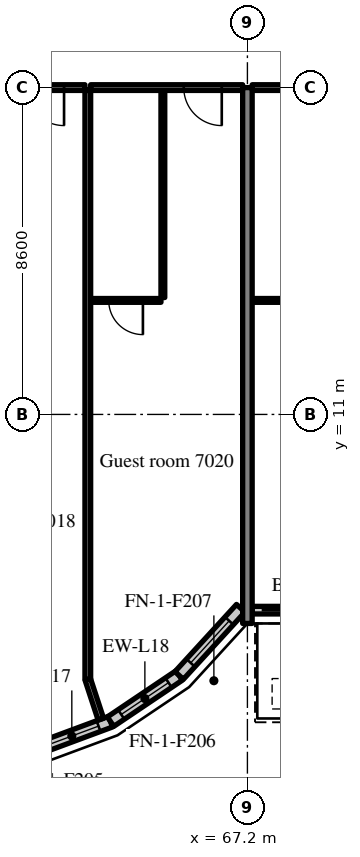
"""IFC4 building model, lengths in metres.
Left out: names, types, materials, properties, quantities, classifications, styles, units other than length and angle.
Written with IfcOpenShell. Run it as: python <this file> out.ifc"""

import sys

from ifc_helpers import new_model, si_unit, direction, frame, frame_2d, origin, place, context, subcontext, project, spatial, rectangle, extrude, source, transform, mapped, element, fill, save


model = new_model("IFC4")
c1 = context("Model", 3, precision=1e-05, world=origin(), true_north=direction((0.0, 1.0)))
c2 = subcontext(c1, "Body", "Model", "MODEL_VIEW")
j1 = project(units=[si_unit("LENGTHUNIT", "METRE"), si_unit("PLANEANGLEUNIT", "RADIAN")], contexts=[c1])
p1 = place(None, origin())
s1 = spatial("IfcSite", under=j1, at=p1, CompositionType="ELEMENT")
p2 = place(p1, origin())
s2 = spatial("IfcBuilding", under=s1, at=p2, CompositionType="ELEMENT")
p3 = place(p2, frame((0.0, 0.0, 293.7)))
s3 = spatial("IfcBuildingStorey", under=s2, at=p3, CompositionType="ELEMENT", Elevation=293.7)
m1 = source(origin(), c2, "Body", "SweptSolid", [
    extrude(rectangle(XDim=14.1, YDim=0.25, at=frame_2d((7.05, 0.0))), origin(), (0.0, 0.0, 1.0), 3.72),
])
p4 = place(p3, frame((67.2, 5.5, 0.0), z_axis=(0.0, 0.0, 1.0), x_axis=(0.0, 1.0, 0.0)))
e1 = element("IfcWall", 1, at=p4, inside=s3, PredefinedType="SHEAR", context=c2, shape_type="MappedRepresentation", body=[
    mapped(m1, transform((0.0, 0.0, 0.0), scale=1.0)),
])
m2 = source(origin(), c2, "Body", "SweptSolid", [
    extrude(rectangle(XDim=2.176, YDim=0.3, at=frame_2d((1.088, 0.0))), origin(), (0.0, 0.0, 1.0), 3.72),
])
p5 = place(p3, frame((61.56, 2.16, 0.0), z_axis=(0.0, 0.0, 1.0), x_axis=(0.937531979054, 0.347899106424, 0.0)))
e2 = element("IfcWall", 2, at=p5, inside=s3, PredefinedType="SOLIDWALL", context=c2, shape_type="MappedRepresentation", body=[
    mapped(m2, transform((0.0, 0.0, 0.0), scale=1.0)),
])
m3 = source(origin(), c2, "Body", "SweptSolid", [
    extrude(rectangle(XDim=1.5, YDim=2.0, at=frame_2d((0.75, 1.0))), frame((0.0, 0.16, 0.0), z_axis=(0.0, -1.0, 0.0), x_axis=(1.0, 0.0, 0.0)), (0.0, 0.0, 1.0), 0.32),
])
p6 = place(p5, frame((0.338, 0.0, 0.9)))
e3 = element("IfcOpeningElement", 3, at=p6, cuts=e2, PredefinedType="OPENING", context=c2, shape_type="MappedRepresentation", body=[
    mapped(m3, transform((0.0, 0.0, 0.0), scale=1.0)),
])
m4 = source(origin(), c2, "Body", "SweptSolid", [
    extrude(rectangle(XDim=2.176, YDim=0.3, at=frame_2d((1.088, 0.0))), origin(), (0.0, 0.0, 1.0), 3.72),
])
p7 = place(p3, frame((63.599, 2.917, 0.0), z_axis=(0.0, 0.0, 1.0), x_axis=(0.829625727223, 0.558319937607, 0.0)))
e4 = element("IfcWall", 4, at=p7, inside=s3, PredefinedType="SOLIDWALL", context=c2, shape_type="MappedRepresentation", body=[
    mapped(m4, transform((0.0, 0.0, 0.0), scale=1.0)),
])
p8 = place(p7, frame((0.338, 0.0, 0.9)))
e5 = element("IfcOpeningElement", 5, at=p8, cuts=e4, PredefinedType="OPENING", context=c2, shape_type="MappedRepresentation", body=[
    mapped(m3, transform((0.0, 0.0, 0.0), scale=1.0)),
])
m5 = source(origin(), c2, "Body", "SweptSolid", [
    extrude(rectangle(XDim=2.398, YDim=0.3, at=frame_2d((1.199, 0.0))), origin(), (0.0, 0.0, 1.0), 3.72),
])
p9 = place(p3, frame((65.404, 4.131, 0.0), z_axis=(0.0, 0.0, 1.0), x_axis=(0.675374189419, 0.737475222815, 0.0)))
e6 = element("IfcWall", 6, at=p9, inside=s3, PredefinedType="SOLIDWALL", context=c2, shape_type="MappedRepresentation", body=[
    mapped(m5, transform((0.0, 0.0, 0.0), scale=1.0)),
])
p10 = place(p9, frame((0.449, 0.0, 0.9)))
e7 = element("IfcOpeningElement", 7, at=p10, cuts=e6, PredefinedType="OPENING", context=c2, shape_type="MappedRepresentation", body=[
    mapped(m3, transform((0.0, 0.0, 0.0), scale=1.0)),
])
m6 = source(origin(), c2, "Body", "SweptSolid", [
    extrude(rectangle(XDim=8.15, YDim=0.2, at=frame_2d((4.075, 0.0))), origin(), (0.0, 0.0, 1.0), 3.17),
])
p11 = place(p3, frame((67.325, 5.85, 0.0), z_axis=(0.0, 0.0, 1.0), x_axis=(1.0, 0.0, 0.0)))
e8 = element("IfcWall", 8, at=p11, inside=s3, PredefinedType="SOLIDWALL", context=c2, shape_type="MappedRepresentation", body=[
    mapped(m6, transform((0.0, 0.0, 0.0), scale=1.0)),
])
m7 = source(origin(), c2, "Body", "SweptSolid", [
    extrude(rectangle(XDim=1.2, YDim=2.4, at=frame_2d((0.6, 1.2))), frame((0.0, 0.11, 0.0), z_axis=(0.0, -1.0, 0.0), x_axis=(1.0, 0.0, 0.0)), (0.0, 0.0, 1.0), 0.22),
])
p12 = place(p11, frame((0.25, 0.0, 0.0)))
e9 = element("IfcOpeningElement", 9, at=p12, cuts=e8, PredefinedType="OPENING", context=c2, shape_type="MappedRepresentation", body=[
    mapped(m7, transform((0.0, 0.0, 0.0), scale=1.0)),
])
m8 = source(origin(), c2, "Body", "SweptSolid", [
    extrude(rectangle(XDim=1.5, YDim=1.5, at=frame_2d((0.75, 0.75))), frame((0.0, 0.11, 0.0), z_axis=(0.0, -1.0, 0.0), x_axis=(1.0, 0.0, 0.0)), (0.0, 0.0, 1.0), 0.22),
])
p13 = place(p11, frame((2.325, 0.0, 0.9)))
e10 = element("IfcOpeningElement", 10, at=p13, cuts=e8, PredefinedType="OPENING", context=c2, shape_type="MappedRepresentation", body=[
    mapped(m8, transform((0.0, 0.0, 0.0), scale=1.0)),
])
p14 = place(p11, frame((4.325, 0.0, 0.0)))
e11 = element("IfcOpeningElement", 11, at=p14, cuts=e8, PredefinedType="OPENING", context=c2, shape_type="MappedRepresentation", body=[
    mapped(m7, transform((0.0, 0.0, 0.0), scale=1.0)),
])
p15 = place(p11, frame((6.4, 0.0, 0.9)))
e12 = element("IfcOpeningElement", 12, at=p15, cuts=e8, PredefinedType="OPENING", context=c2, shape_type="MappedRepresentation", body=[
    mapped(m8, transform((0.0, 0.0, 0.0), scale=1.0)),
])
m9 = source(origin(), c2, "Body", "SweptSolid", [
    extrude(rectangle(XDim=4.0, YDim=0.15, at=frame_2d((2.0, 0.0))), origin(), (0.0, 0.0, 1.0), 3.02),
])
p16 = place(p3, frame((58.925, 19.6, 0.0), z_axis=(0.0, 0.0, 1.0), x_axis=(1.0, 0.0, 0.0)))
e13 = element("IfcWall", 13, at=p16, inside=s3, PredefinedType="PARTITIONING", context=c2, shape_type="MappedRepresentation", body=[
    mapped(m9, transform((0.0, 0.0, 0.0), scale=1.0)),
])
m10 = source(origin(), c2, "Body", "SweptSolid", [
    extrude(rectangle(XDim=1.0, YDim=2.1, at=frame_2d((0.5, 1.05))), frame((0.0, 0.085, 0.0), z_axis=(0.0, -1.0, 0.0), x_axis=(1.0, 0.0, 0.0)), (0.0, 0.0, 1.0), 0.17),
])
p17 = place(p16, frame((2.45, 0.0, 0.0)))
e14 = element("IfcOpeningElement", 14, at=p17, cuts=e13, PredefinedType="OPENING", context=c2, shape_type="MappedRepresentation", body=[
    mapped(m10, transform((0.0, 0.0, 0.0), scale=1.0)),
])
m11 = source(origin(), c2, "Body", "SweptSolid", [
    extrude(rectangle(XDim=5.45, YDim=0.1, at=frame_2d((2.725, 0.0))), origin(), (0.0, 0.0, 1.0), 3.72),
])
p18 = place(p3, frame((64.975, 14.075, 0.0), z_axis=(0.0, 0.0, 1.0), x_axis=(0.0, 1.0, 0.0)))
e15 = element("IfcWall", 15, at=p18, inside=s3, PredefinedType="PARTITIONING", context=c2, shape_type="MappedRepresentation", body=[
    mapped(m11, transform((0.0, 0.0, 0.0), scale=1.0)),
])
m12 = source(origin(), c2, "Body", "SweptSolid", [
    extrude(rectangle(XDim=1.85, YDim=0.1, at=frame_2d((0.925, 0.0))), origin(), (0.0, 0.0, 1.0), 3.72),
])
p19 = place(p3, frame((63.075, 14.0, 0.0), z_axis=(0.0, 0.0, 1.0), x_axis=(1.0, 0.0, 0.0)))
e16 = element("IfcWall", 16, at=p19, inside=s3, PredefinedType="PARTITIONING", context=c2, shape_type="MappedRepresentation", body=[
    mapped(m12, transform((0.0, 0.0, 0.0), scale=1.0)),
])
m13 = source(origin(), c2, "Body", "SweptSolid", [
    extrude(rectangle(XDim=0.9, YDim=2.1, at=frame_2d((0.45, 1.05))), frame((0.0, 0.06, 0.0), z_axis=(0.0, -1.0, 0.0), x_axis=(1.0, 0.0, 0.0)), (0.0, 0.0, 1.0), 0.12),
])
p20 = place(p19, frame((0.475, 0.0, 0.0)))
e17 = element("IfcOpeningElement", 17, at=p20, cuts=e16, PredefinedType="OPENING", context=c2, shape_type="MappedRepresentation", body=[
    mapped(m13, transform((0.0, 0.0, 0.0), scale=1.0)),
])
p21 = place(p3, frame((63.075, 19.6, 0.0), z_axis=(0.0, 0.0, 1.0), x_axis=(1.0, 0.0, 0.0)))
e18 = element("IfcWall", 18, at=p21, inside=s3, PredefinedType="PARTITIONING", context=c2, shape_type="MappedRepresentation", body=[
    mapped(m9, transform((0.0, 0.0, 0.0), scale=1.0)),
])
p22 = place(p21, frame((2.45, 0.0, 0.0)))
e19 = element("IfcOpeningElement", 19, at=p22, cuts=e18, PredefinedType="OPENING", context=c2, shape_type="MappedRepresentation", body=[
    mapped(m10, transform((0.0, 0.0, 0.0), scale=1.0)),
])
m14 = source(origin(), c2, "Body", "SweptSolid", [
    extrude(rectangle(XDim=15.498, YDim=0.15, at=frame_2d((7.749, 0.0))), origin(), (0.0, 0.0, 1.0), 3.72),
])
p23 = place(p3, frame((63.0, 4.027, 0.0), z_axis=(0.0, 0.0, 1.0), x_axis=(0.0, 1.0, 0.0)))
e20 = element("IfcWall", 20, at=p23, inside=s3, PredefinedType="PARTITIONING", context=c2, shape_type="MappedRepresentation", body=[
    mapped(m14, transform((0.0, 0.0, 0.0), scale=1.0)),
])
m15 = source(origin(), c2, "Body", "SweptSolid", [
    extrude(rectangle(XDim=2.4, YDim=0.1, at=frame_2d((1.2, 0.0))), origin(), (0.0, 0.0, 1.0), 3.72),
])
p24 = place(p3, frame((67.325, 14.0, 0.0), z_axis=(0.0, 0.0, 1.0), x_axis=(1.0, 0.0, 0.0)))
e21 = element("IfcWall", 21, at=p24, inside=s3, PredefinedType="PARTITIONING", context=c2, shape_type="MappedRepresentation", body=[
    mapped(m15, transform((0.0, 0.0, 0.0), scale=1.0)),
])
p25 = place(p24, frame((0.75, 0.0, 0.0)))
e22 = element("IfcOpeningElement", 22, at=p25, cuts=e21, PredefinedType="OPENING", context=c2, shape_type="MappedRepresentation", body=[
    mapped(m13, transform((0.0, 0.0, 0.0), scale=1.0)),
])
m16 = source(origin(), c2, "Body", "SweptSolid", [
    extrude(rectangle(XDim=8.15, YDim=0.15, at=frame_2d((4.075, 0.0))), origin(), (0.0, 0.0, 1.0), 3.02),
])
p26 = place(p3, frame((67.325, 19.6, 0.0), z_axis=(0.0, 0.0, 1.0), x_axis=(1.0, 0.0, 0.0)))
e23 = element("IfcWall", 23, at=p26, inside=s3, PredefinedType="PARTITIONING", context=c2, shape_type="MappedRepresentation", body=[
    mapped(m16, transform((0.0, 0.0, 0.0), scale=1.0)),
])
p27 = place(p26, frame((6.6, 0.0, 0.0)))
e24 = element("IfcOpeningElement", 24, at=p27, cuts=e23, PredefinedType="OPENING", context=c2, shape_type="MappedRepresentation", body=[
    mapped(m10, transform((0.0, 0.0, 0.0), scale=1.0)),
])
m17 = source(origin(), c2, "Body", "SweptSolid", [
    extrude(rectangle(XDim=1.101, YDim=0.15, at=frame_2d((0.55, 0.0))), origin(), (0.0, 0.0, 1.0), 3.72),
])
p28 = place(p3, frame((63.343, 2.981, 0.0), z_axis=(0.0, 0.0, 1.0), x_axis=(-0.311567081539, 0.950224159712, 0.0)))
e25 = element("IfcWall", 25, at=p28, inside=s3, PredefinedType="PARTITIONING", context=c2, shape_type="MappedRepresentation", body=[
    mapped(m17, transform((0.0, 0.0, 0.0), scale=1.0)),
])
m18 = source(origin(), c2, "Body", "SweptSolid", [
    extrude(rectangle(XDim=1.5, YDim=2.0, at=frame_2d((0.75, 1.0))), frame((0.0, 0.03, 0.0), z_axis=(0.0, -1.0, 0.0), x_axis=(1.0, 0.0, 0.0)), (0.0, 0.0, 1.0), 0.06),
])
p29 = place(p6, origin())
e26 = element("IfcWindow", 26, at=p29, inside=s3, PartitioningType="SINGLE_PANEL", PredefinedType="WINDOW", context=c2, shape_type="MappedRepresentation", body=[
    mapped(m18, transform((0.0, 0.0, 0.0), scale=1.0)),
])
fill(e3, e26)
p30 = place(p8, origin())
e27 = element("IfcWindow", 27, at=p30, inside=s3, PartitioningType="SINGLE_PANEL", PredefinedType="WINDOW", context=c2, shape_type="MappedRepresentation", body=[
    mapped(m18, transform((0.0, 0.0, 0.0), scale=1.0)),
])
fill(e5, e27)
p31 = place(p10, origin())
e28 = element("IfcWindow", 28, at=p31, inside=s3, PartitioningType="SINGLE_PANEL", PredefinedType="WINDOW", context=c2, shape_type="MappedRepresentation", body=[
    mapped(m18, transform((0.0, 0.0, 0.0), scale=1.0)),
])
fill(e7, e28)
m19 = source(origin(), c2, "Body", "SweptSolid", [
    extrude(rectangle(XDim=1.2, YDim=2.4, at=frame_2d((0.6, 1.2))), frame((0.0, 0.025, 0.0), z_axis=(0.0, -1.0, 0.0), x_axis=(1.0, 0.0, 0.0)), (0.0, 0.0, 1.0), 0.05),
])
p32 = place(p12, origin())
e29 = element("IfcDoor", 29, at=p32, inside=s3, OperationType="SLIDING_TO_LEFT", PredefinedType="DOOR", context=c2, shape_type="MappedRepresentation", body=[
    mapped(m19, transform((0.0, 0.0, 0.0), scale=1.0)),
])
fill(e9, e29)
m20 = source(origin(), c2, "Body", "SweptSolid", [
    extrude(rectangle(XDim=1.0, YDim=2.1, at=frame_2d((0.5, 1.05))), frame((0.0, 0.025, 0.0), z_axis=(0.0, -1.0, 0.0), x_axis=(1.0, 0.0, 0.0)), (0.0, 0.0, 1.0), 0.05),
])
p33 = place(p17, origin())
e30 = element("IfcDoor", 30, at=p33, inside=s3, OperationType="SINGLE_SWING_RIGHT", PredefinedType="DOOR", context=c2, shape_type="MappedRepresentation", body=[
    mapped(m20, transform((0.0, 0.0, 0.0), scale=1.0)),
])
fill(e14, e30)
m21 = source(origin(), c2, "Body", "SweptSolid", [
    extrude(rectangle(XDim=0.9, YDim=2.1, at=frame_2d((0.45, 1.05))), frame((0.0, 0.025, 0.0), z_axis=(0.0, -1.0, 0.0), x_axis=(1.0, 0.0, 0.0)), (0.0, 0.0, 1.0), 0.05),
])
p34 = place(p20, origin())
e31 = element("IfcDoor", 31, at=p34, inside=s3, OperationType="SINGLE_SWING_RIGHT", PredefinedType="DOOR", context=c2, shape_type="MappedRepresentation", body=[
    mapped(m21, transform((0.0, 0.0, 0.0), scale=1.0)),
])
fill(e17, e31)
p35 = place(p22, origin())
e32 = element("IfcDoor", 32, at=p35, inside=s3, OperationType="SINGLE_SWING_RIGHT", PredefinedType="DOOR", context=c2, shape_type="MappedRepresentation", body=[
    mapped(m20, transform((0.0, 0.0, 0.0), scale=1.0)),
])
fill(e19, e32)
save(model, sys.argv[1])
